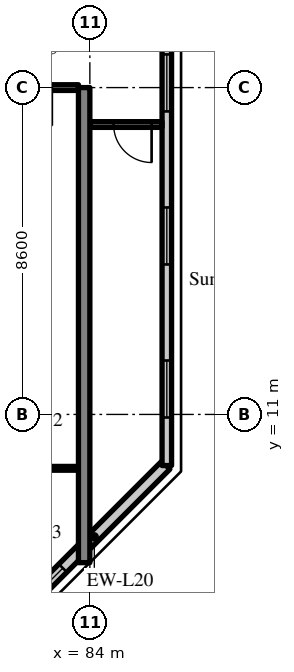
"""IFC4 building model, lengths in metres.
Left out: names, types, materials, properties, quantities, classifications, styles, units other than length and angle.
Written with IfcOpenShell. Run it as: python <this file> out.ifc"""

import sys

from ifc_helpers import new_model, si_unit, direction, frame, frame_2d, origin, place, context, subcontext, project, spatial, rectangle, extrude, source, transform, mapped, element, fill, save


model = new_model("IFC4")
c1 = context("Model", 3, precision=1e-05, world=origin(), true_north=direction((0.0, 1.0)))
c2 = subcontext(c1, "Body", "Model", "MODEL_VIEW")
j1 = project(units=[si_unit("LENGTHUNIT", "METRE"), si_unit("PLANEANGLEUNIT", "RADIAN")], contexts=[c1])
p1 = place(None, origin())
s1 = spatial("IfcSite", under=j1, at=p1, CompositionType="ELEMENT")
p2 = place(p1, origin())
s2 = spatial("IfcBuilding", under=s1, at=p2, CompositionType="ELEMENT")
p3 = place(p2, frame((0.0, 0.0, 249.1)))
s3 = spatial("IfcBuildingStorey", under=s2, at=p3, CompositionType="ELEMENT", Elevation=249.1)
m1 = source(origin(), c2, "Body", "SweptSolid", [
    extrude(rectangle(XDim=12.5, YDim=0.3, at=frame_2d((6.25, 0.0))), origin(), (0.0, 0.0, 1.0), 3.62),
])
p4 = place(p3, frame((83.85, 7.1, 0.0), z_axis=(0.0, 0.0, 1.0), x_axis=(0.0, 1.0, 0.0)))
e1 = element("IfcWall", 1, at=p4, inside=s3, PredefinedType="SHEAR", context=c2, shape_type="MappedRepresentation", body=[
    mapped(m1, transform((0.0, 0.0, 0.0), scale=1.0)),
])
m2 = source(origin(), c2, "Body", "SweptSolid", [
    extrude(rectangle(XDim=5.326, YDim=0.3, at=frame_2d((2.663, 0.0))), origin(), (0.0, 0.0, 1.0), 3.62),
])
p5 = place(p3, frame((82.234, 5.9, 0.0), z_axis=(0.0, 0.0, 1.0), x_axis=(0.707083859269, 0.707129702361, 0.0)))
e2 = element("IfcWall", 2, at=p5, inside=s3, PredefinedType="SOLIDWALL", context=c2, shape_type="MappedRepresentation", body=[
    mapped(m2, transform((0.0, 0.0, 0.0), scale=1.0)),
])
m3 = source(origin(), c2, "Body", "SweptSolid", [
    extrude(rectangle(XDim=1.2, YDim=1.5, at=frame_2d((0.6, 0.75))), frame((0.0, 0.16, 0.0), z_axis=(0.0, -1.0, 0.0), x_axis=(1.0, 0.0, 0.0)), (0.0, 0.0, 1.0), 0.32),
])
p6 = place(p5, frame((0.292, 0.0, 0.9)))
e3 = element("IfcOpeningElement", 3, at=p6, cuts=e2, PredefinedType="OPENING", context=c2, shape_type="MappedRepresentation", body=[
    mapped(m3, transform((0.0, 0.0, 0.0), scale=1.0)),
])
m4 = source(origin(), c2, "Body", "SweptSolid", [
    extrude(rectangle(XDim=28.189, YDim=0.25, at=frame_2d((14.095, 0.0))), origin(), (0.0, 0.0, 1.0), 3.62),
])
p7 = place(p3, frame((86.025, 9.655, 0.0), z_axis=(0.0, 0.0, 1.0), x_axis=(0.0, 1.0, 0.0)))
e4 = element("IfcWall", 4, at=p7, inside=s3, PredefinedType="SOLIDWALL", context=c2, shape_type="MappedRepresentation", body=[
    mapped(m4, transform((0.0, 0.0, 0.0), scale=1.0)),
])
m5 = source(origin(), c2, "Body", "SweptSolid", [
    extrude(rectangle(XDim=1.5, YDim=1.5, at=frame_2d((0.75, 0.75))), frame((0.0, 0.135, 0.0), z_axis=(0.0, -1.0, 0.0), x_axis=(1.0, 0.0, 0.0)), (0.0, 0.0, 1.0), 0.27),
])
p8 = place(p7, frame((1.263, 0.0, 0.9)))
e5 = element("IfcOpeningElement", 5, at=p8, cuts=e4, PredefinedType="OPENING", context=c2, shape_type="MappedRepresentation", body=[
    mapped(m5, transform((0.0, 0.0, 0.0), scale=1.0)),
])
p9 = place(p7, frame((5.291, 0.0, 0.9)))
e6 = element("IfcOpeningElement", 6, at=p9, cuts=e4, PredefinedType="OPENING", context=c2, shape_type="MappedRepresentation", body=[
    mapped(m5, transform((0.0, 0.0, 0.0), scale=1.0)),
])
p10 = place(p7, frame((9.318, 0.0, 0.9)))
e7 = element("IfcOpeningElement", 7, at=p10, cuts=e4, PredefinedType="OPENING", context=c2, shape_type="MappedRepresentation", body=[
    mapped(m5, transform((0.0, 0.0, 0.0), scale=1.0)),
])
p11 = place(p7, frame((13.345, 0.0, 0.9)))
e8 = element("IfcOpeningElement", 8, at=p11, cuts=e4, PredefinedType="OPENING", context=c2, shape_type="MappedRepresentation", body=[
    mapped(m5, transform((0.0, 0.0, 0.0), scale=1.0)),
])
p12 = place(p7, frame((17.372, 0.0, 0.9)))
e9 = element("IfcOpeningElement", 9, at=p12, cuts=e4, PredefinedType="OPENING", context=c2, shape_type="MappedRepresentation", body=[
    mapped(m5, transform((0.0, 0.0, 0.0), scale=1.0)),
])
p13 = place(p7, frame((21.399, 0.0, 0.9)))
e10 = element("IfcOpeningElement", 10, at=p13, cuts=e4, PredefinedType="OPENING", context=c2, shape_type="MappedRepresentation", body=[
    mapped(m5, transform((0.0, 0.0, 0.0), scale=1.0)),
])
p14 = place(p7, frame((25.426, 0.0, 0.9)))
e11 = element("IfcOpeningElement", 11, at=p14, cuts=e4, PredefinedType="OPENING", context=c2, shape_type="MappedRepresentation", body=[
    mapped(m5, transform((0.0, 0.0, 0.0), scale=1.0)),
])
m6 = source(origin(), c2, "Body", "SweptSolid", [
    extrude(rectangle(XDim=7.95, YDim=0.1, at=frame_2d((3.975, 0.0))), origin(), (0.0, 0.0, 1.0), 3.62),
])
p15 = place(p3, frame((75.75, 9.582, 0.0), z_axis=(0.0, 0.0, 1.0), x_axis=(1.0, 0.0, 0.0)))
e12 = element("IfcWall", 12, at=p15, inside=s3, PredefinedType="PARTITIONING", context=c2, shape_type="MappedRepresentation", body=[
    mapped(m6, transform((0.0, 0.0, 0.0), scale=1.0)),
])
m7 = source(origin(), c2, "Body", "SweptSolid", [
    extrude(rectangle(XDim=1.8, YDim=2.1, at=frame_2d((0.9, 1.05))), frame((0.0, 0.06, 0.0), z_axis=(0.0, -1.0, 0.0), x_axis=(1.0, 0.0, 0.0)), (0.0, 0.0, 1.0), 0.12),
])
p16 = place(p15, frame((3.075, 0.0, 0.0)))
e13 = element("IfcOpeningElement", 13, at=p16, cuts=e12, PredefinedType="OPENING", context=c2, shape_type="MappedRepresentation", body=[
    mapped(m7, transform((0.0, 0.0, 0.0), scale=1.0)),
])
m8 = source(origin(), c2, "Body", "SweptSolid", [
    extrude(rectangle(XDim=7.95, YDim=0.15, at=frame_2d((3.975, 0.0))), origin(), (0.0, 0.0, 1.0), 2.92),
])
p17 = place(p3, frame((75.75, 19.6, 0.0), z_axis=(0.0, 0.0, 1.0), x_axis=(1.0, 0.0, 0.0)))
e14 = element("IfcWall", 14, at=p17, inside=s3, PredefinedType="PARTITIONING", context=c2, shape_type="MappedRepresentation", body=[
    mapped(m8, transform((0.0, 0.0, 0.0), scale=1.0)),
])
m9 = source(origin(), c2, "Body", "SweptSolid", [
    extrude(rectangle(XDim=1.0, YDim=2.1, at=frame_2d((0.5, 1.05))), frame((0.0, 0.085, 0.0), z_axis=(0.0, -1.0, 0.0), x_axis=(1.0, 0.0, 0.0)), (0.0, 0.0, 1.0), 0.17),
])
p18 = place(p17, frame((6.25, 0.0, 0.0)))
e15 = element("IfcOpeningElement", 15, at=p18, cuts=e14, PredefinedType="OPENING", context=c2, shape_type="MappedRepresentation", body=[
    mapped(m9, transform((0.0, 0.0, 0.0), scale=1.0)),
])
m10 = source(origin(), c2, "Body", "SweptSolid", [
    extrude(rectangle(XDim=1.9, YDim=0.15, at=frame_2d((0.95, 0.0))), origin(), (0.0, 0.0, 1.0), 2.92),
])
p19 = place(p3, frame((84.0, 18.628, 0.0), z_axis=(0.0, 0.0, 1.0), x_axis=(1.0, 0.0, 0.0)))
e16 = element("IfcWall", 16, at=p19, inside=s3, PredefinedType="PARTITIONING", context=c2, shape_type="MappedRepresentation", body=[
    mapped(m10, transform((0.0, 0.0, 0.0), scale=1.0)),
])
p20 = place(p19, frame((0.625, 0.0, 0.0)))
e17 = element("IfcOpeningElement", 17, at=p20, cuts=e16, PredefinedType="OPENING", context=c2, shape_type="MappedRepresentation", body=[
    mapped(m9, transform((0.0, 0.0, 0.0), scale=1.0)),
])
m11 = source(origin(), c2, "Body", "SweptSolid", [
    extrude(rectangle(XDim=1.2, YDim=1.5, at=frame_2d((0.6, 0.75))), frame((0.0, 0.03, 0.0), z_axis=(0.0, -1.0, 0.0), x_axis=(1.0, 0.0, 0.0)), (0.0, 0.0, 1.0), 0.06),
])
p21 = place(p6, origin())
e18 = element("IfcWindow", 18, at=p21, inside=s3, PartitioningType="SINGLE_PANEL", PredefinedType="WINDOW", context=c2, shape_type="MappedRepresentation", body=[
    mapped(m11, transform((0.0, 0.0, 0.0), scale=1.0)),
])
fill(e3, e18)
m12 = source(origin(), c2, "Body", "SweptSolid", [
    extrude(rectangle(XDim=1.5, YDim=1.5, at=frame_2d((0.75, 0.75))), frame((0.0, 0.03, 0.0), z_axis=(0.0, -1.0, 0.0), x_axis=(1.0, 0.0, 0.0)), (0.0, 0.0, 1.0), 0.06),
])
p22 = place(p8, origin())
e19 = element("IfcWindow", 19, at=p22, inside=s3, PartitioningType="SINGLE_PANEL", PredefinedType="WINDOW", context=c2, shape_type="MappedRepresentation", body=[
    mapped(m12, transform((0.0, 0.0, 0.0), scale=1.0)),
])
fill(e5, e19)
p23 = place(p9, origin())
e20 = element("IfcWindow", 20, at=p23, inside=s3, PartitioningType="SINGLE_PANEL", PredefinedType="WINDOW", context=c2, shape_type="MappedRepresentation", body=[
    mapped(m12, transform((0.0, 0.0, 0.0), scale=1.0)),
])
fill(e6, e20)
p24 = place(p10, origin())
e21 = element("IfcWindow", 21, at=p24, inside=s3, PartitioningType="SINGLE_PANEL", PredefinedType="WINDOW", context=c2, shape_type="MappedRepresentation", body=[
    mapped(m12, transform((0.0, 0.0, 0.0), scale=1.0)),
])
fill(e7, e21)
m13 = source(origin(), c2, "Body", "SweptSolid", [
    extrude(rectangle(XDim=1.0, YDim=2.1, at=frame_2d((0.5, 1.05))), frame((0.0, 0.025, 0.0), z_axis=(0.0, -1.0, 0.0), x_axis=(1.0, 0.0, 0.0)), (0.0, 0.0, 1.0), 0.05),
])
p25 = place(p20, origin())
e22 = element("IfcDoor", 22, at=p25, inside=s3, OperationType="SINGLE_SWING_RIGHT", PredefinedType="DOOR", context=c2, shape_type="MappedRepresentation", body=[
    mapped(m13, transform((0.0, 0.0, 0.0), scale=1.0)),
])
fill(e17, e22)
save(model, sys.argv[1])
